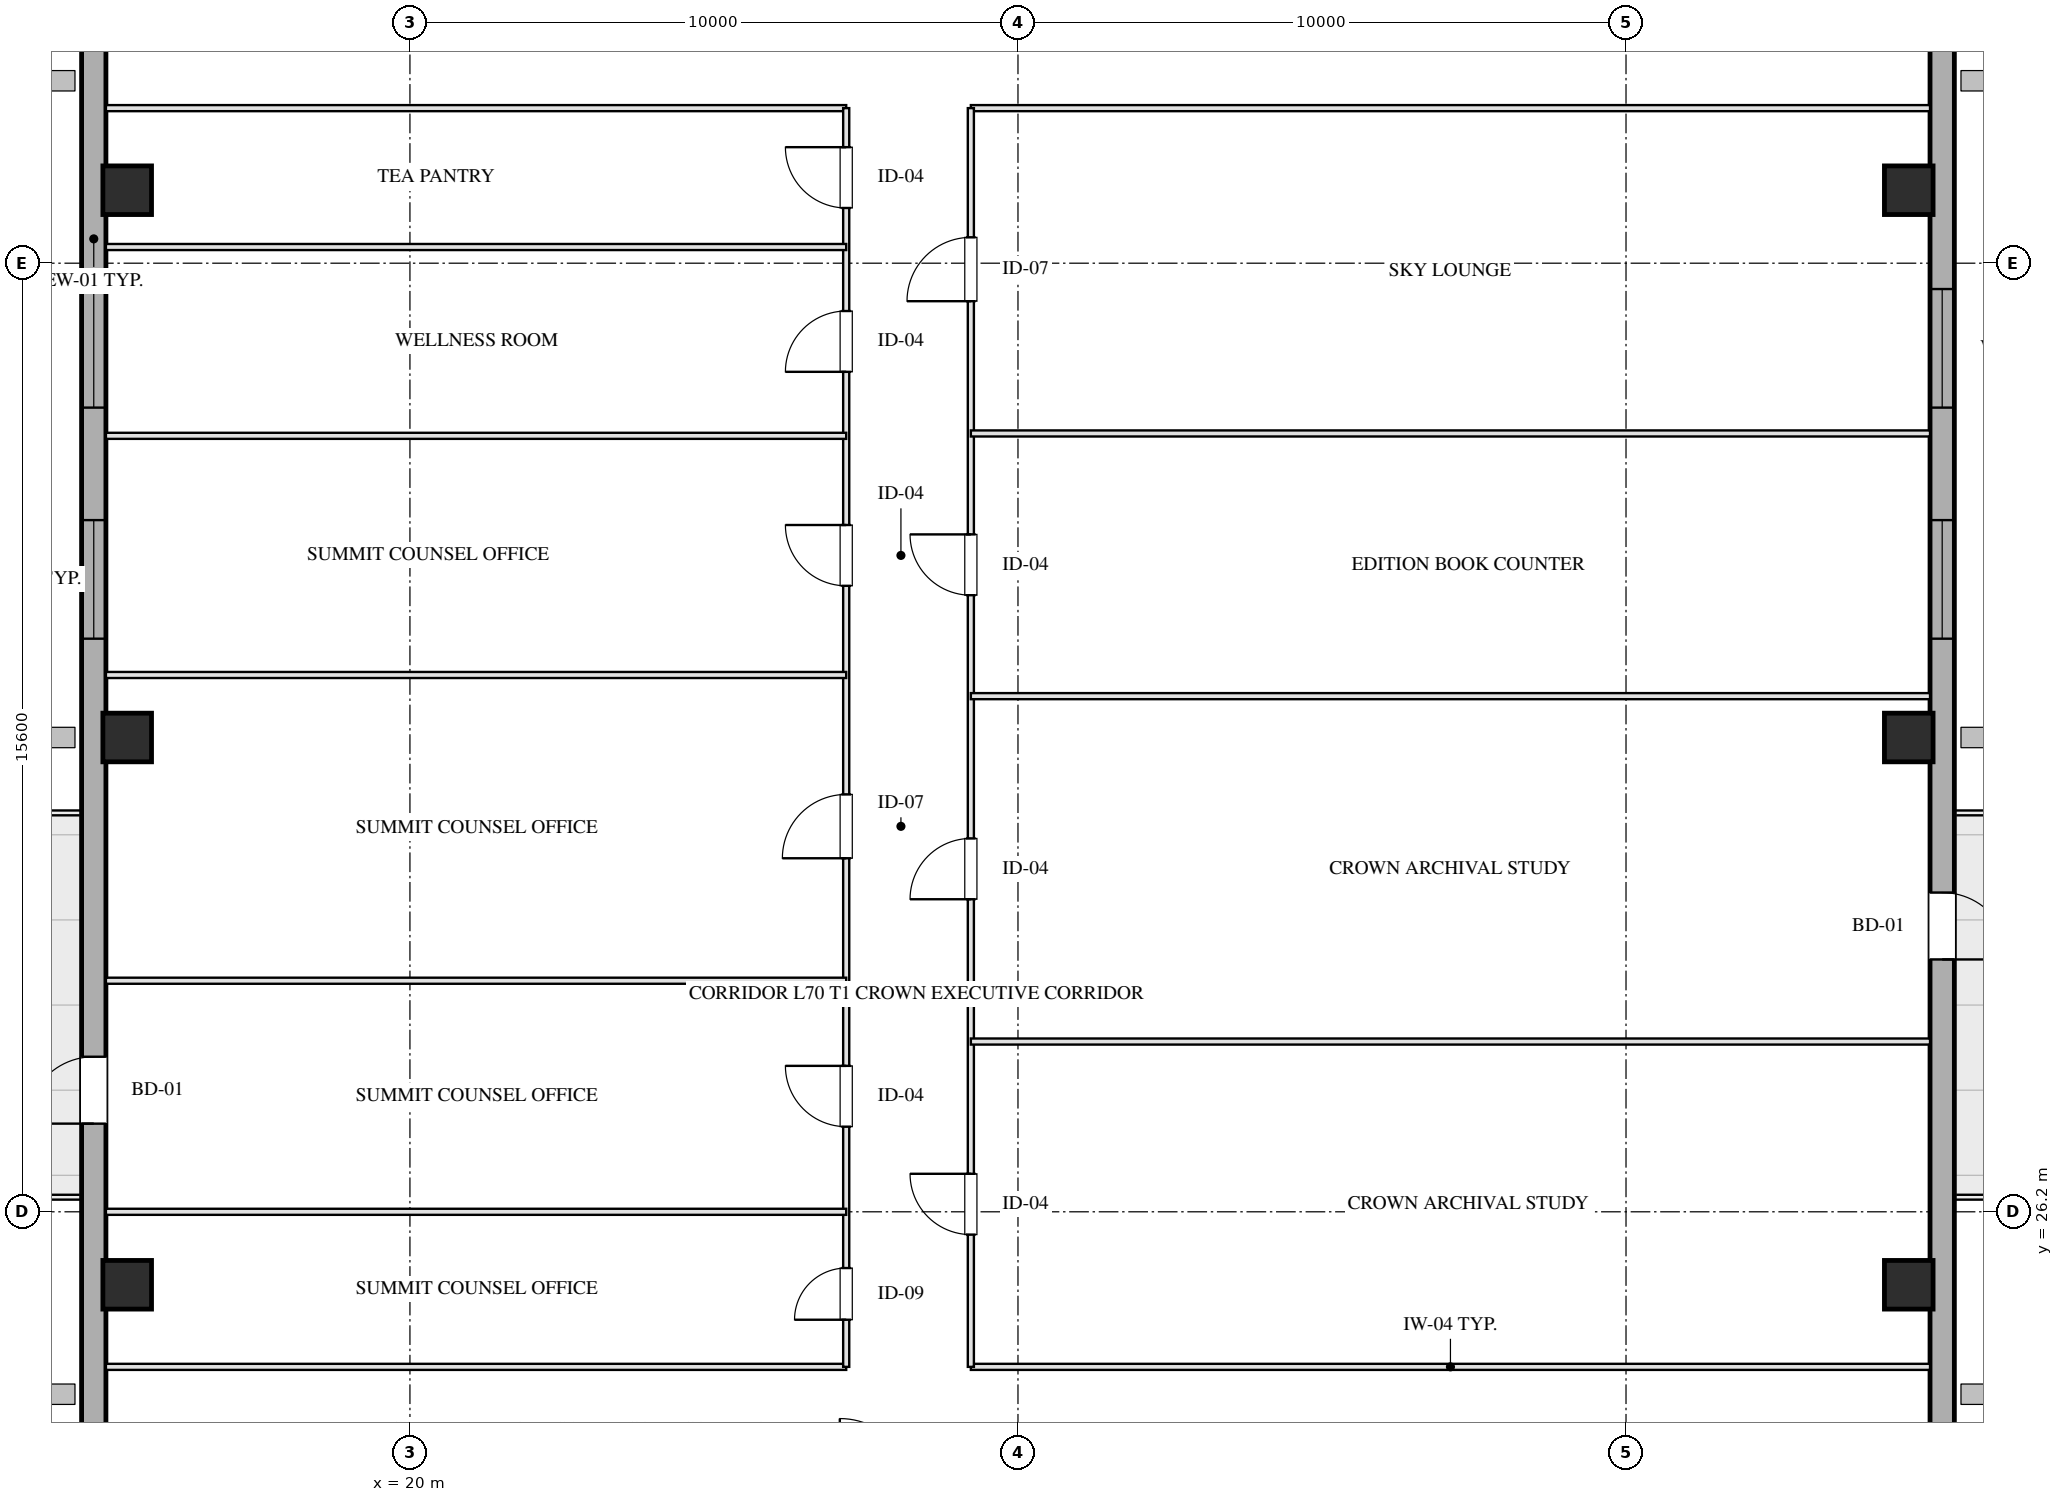
"""IFC4 building model, lengths in metres.
Left out: names, types, materials, properties, quantities, classifications, styles, units other than length and angle.
Written with IfcOpenShell. Run it as: python <this file> out.ifc"""

import sys

from ifc_helpers import new_model, si_unit, direction, frame, frame_2d, origin, origin_2d, place, context, subcontext, project, spatial, rectangle, hollow_rectangle, extrude, element, fill, save


model = new_model("IFC4")
c1 = context("Model", 3, precision=1e-05, world=origin(), true_north=direction((0.0, 1.0)))
c2 = subcontext(c1, "Body", "Model", "MODEL_VIEW")
j1 = project(units=[si_unit("LENGTHUNIT", "METRE"), si_unit("PLANEANGLEUNIT", "RADIAN")], contexts=[c1])
p1 = place(None, origin())
s1 = spatial("IfcSite", under=j1, at=p1, CompositionType="ELEMENT")
p2 = place(p1, origin())
s2 = spatial("IfcBuilding", under=s1, at=p2, CompositionType="ELEMENT")
p3 = place(p2, frame((0.0, 0.0, 256.8)))
s3 = spatial("IfcBuildingStorey", under=s2, at=p3, CompositionType="ELEMENT", Elevation=256.8)
for number, where, z_axis, x_axis in (
    (1, (15.35, 25.0, 0.0), (0.0, 0.0, 1.0), (1.0, 0.0, 0.0)),
    (2, (15.35, 34.0, 0.0), (0.0, 0.0, 1.0), (1.0, 0.0, 0.0)),
    (3, (15.35, 43.0, 0.0), (0.0, 0.0, 1.0), (1.0, 0.0, 0.0)),
    (4, (44.65, 25.0, 0.0), (0.0, 0.0, 1.0), (1.0, 0.0, 0.0)),
    (5, (44.65, 34.0, 0.0), (0.0, 0.0, 1.0), (1.0, 0.0, 0.0)),
    (6, (44.65, 43.0, 0.0), (0.0, 0.0, 1.0), (1.0, 0.0, 0.0)),
):
    element("IfcColumn", number, at=place(p3, frame(where, z_axis=z_axis, x_axis=x_axis)), inside=s3, PredefinedType="COLUMN", context=c2, shape_type="SweptSolid", body=[
        extrude(hollow_rectangle(XDim=0.8, YDim=0.8, WallThickness=0.028, at=origin_2d()), origin(), (0.0, 0.0, 1.0), 3.201),
    ])
p4 = place(p3, frame((14.8, 13.1, 0.0), z_axis=(0.0, 0.0, 1.0), x_axis=(0.0, 1.0, 0.0)))
e7 = element("IfcWall", 7, at=p4, inside=s3, PredefinedType="SOLIDWALL", context=c2, shape_type="SweptSolid", body=[
    extrude(rectangle(XDim=41.8, YDim=0.4, at=frame_2d((20.9, 0.0))), origin(), (0.0, 0.0, 1.0), 2.36),
])
p5 = place(p4, frame((22.525, 0.0, 0.75)))
e8 = element("IfcOpeningElement", 8, at=p5, cuts=e7, PredefinedType="OPENING", context=c2, shape_type="SweptSolid", body=[
    extrude(rectangle(XDim=1.95, YDim=1.21, at=frame_2d((0.975, 0.605))), frame((0.0, 0.21, 0.0), z_axis=(0.0, -1.0, 0.0), x_axis=(1.0, 0.0, 0.0)), (0.0, 0.0, 1.0), 0.42),
])
p6 = place(p4, frame((26.325, 0.0, 0.75)))
e9 = element("IfcOpeningElement", 9, at=p6, cuts=e7, PredefinedType="OPENING", context=c2, shape_type="SweptSolid", body=[
    extrude(rectangle(XDim=1.95, YDim=1.21, at=frame_2d((0.975, 0.605))), frame((0.0, 0.21, 0.0), z_axis=(0.0, -1.0, 0.0), x_axis=(1.0, 0.0, 0.0)), (0.0, 0.0, 1.0), 0.42),
])
p7 = place(p4, frame((14.55, 0.0, 0.0)))
e10 = element("IfcOpeningElement", 10, at=p7, cuts=e7, PredefinedType="OPENING", context=c2, shape_type="SweptSolid", body=[
    extrude(rectangle(XDim=1.1, YDim=2.15, at=frame_2d((0.55, 1.075))), frame((0.0, 0.21, 0.0), z_axis=(0.0, -1.0, 0.0), x_axis=(1.0, 0.0, 0.0)), (0.0, 0.0, 1.0), 0.42),
])
p8 = place(p3, frame((45.2, 54.9, 0.0), z_axis=(0.0, 0.0, 1.0), x_axis=(0.0, -1.0, 0.0)))
e11 = element("IfcWall", 11, at=p8, inside=s3, PredefinedType="SOLIDWALL", context=c2, shape_type="SweptSolid", body=[
    extrude(rectangle(XDim=41.8, YDim=0.4, at=frame_2d((20.9, 0.0))), origin(), (0.0, 0.0, 1.0), 2.36),
])
p9 = place(p8, frame((17.325, 0.0, 0.75)))
e12 = element("IfcOpeningElement", 12, at=p9, cuts=e11, PredefinedType="OPENING", context=c2, shape_type="SweptSolid", body=[
    extrude(rectangle(XDim=1.95, YDim=1.21, at=frame_2d((0.975, 0.605))), frame((0.0, 0.21, 0.0), z_axis=(0.0, -1.0, 0.0), x_axis=(1.0, 0.0, 0.0)), (0.0, 0.0, 1.0), 0.42),
])
p10 = place(p8, frame((13.525, 0.0, 0.75)))
e13 = element("IfcOpeningElement", 13, at=p10, cuts=e11, PredefinedType="OPENING", context=c2, shape_type="SweptSolid", body=[
    extrude(rectangle(XDim=1.95, YDim=1.21, at=frame_2d((0.975, 0.605))), frame((0.0, 0.21, 0.0), z_axis=(0.0, -1.0, 0.0), x_axis=(1.0, 0.0, 0.0)), (0.0, 0.0, 1.0), 0.42),
])
p11 = place(p8, frame((23.45, 0.0, 0.0)))
e14 = element("IfcOpeningElement", 14, at=p11, cuts=e11, PredefinedType="OPENING", context=c2, shape_type="SweptSolid", body=[
    extrude(rectangle(XDim=1.1, YDim=2.15, at=frame_2d((0.55, 1.075))), frame((0.0, 0.21, 0.0), z_axis=(0.0, -1.0, 0.0), x_axis=(1.0, 0.0, 0.0)), (0.0, 0.0, 1.0), 0.42),
])
p12 = place(p3, frame((15.0, 23.65, 0.0), z_axis=(0.0, 0.0, 1.0), x_axis=(1.0, 0.0, 0.0)))
e15 = element("IfcWall", 15, at=p12, inside=s3, PredefinedType="MOVABLE", context=c2, shape_type="SweptSolid", body=[
    extrude(rectangle(XDim=12.175, YDim=0.1, at=frame_2d((6.087, 0.0))), origin(), (0.0, 0.0, 1.0), 2.925),
])
p13 = place(p3, frame((29.225, 23.65, 0.0), z_axis=(0.0, 0.0, 1.0), x_axis=(1.0, 0.0, 0.0)))
e16 = element("IfcWall", 16, at=p13, inside=s3, PredefinedType="MOVABLE", context=c2, shape_type="SweptSolid", body=[
    extrude(rectangle(XDim=15.775, YDim=0.1, at=frame_2d((7.887, 0.0))), origin(), (0.0, 0.0, 1.0), 2.925),
])
p14 = place(p3, frame((15.0, 44.35, 0.0), z_axis=(0.0, 0.0, 1.0), x_axis=(1.0, 0.0, 0.0)))
e17 = element("IfcWall", 17, at=p14, inside=s3, PredefinedType="MOVABLE", context=c2, shape_type="SweptSolid", body=[
    extrude(rectangle(XDim=12.175, YDim=0.1, at=frame_2d((6.087, 0.0))), origin(), (0.0, 0.0, 1.0), 2.925),
])
p15 = place(p3, frame((29.225, 44.35, 0.0), z_axis=(0.0, 0.0, 1.0), x_axis=(1.0, 0.0, 0.0)))
e18 = element("IfcWall", 18, at=p15, inside=s3, PredefinedType="MOVABLE", context=c2, shape_type="SweptSolid", body=[
    extrude(rectangle(XDim=15.775, YDim=0.1, at=frame_2d((7.887, 0.0))), origin(), (0.0, 0.0, 1.0), 2.925),
])
p16 = place(p3, frame((27.175, 23.65, 0.0), z_axis=(0.0, 0.0, 1.0), x_axis=(0.0, 1.0, 0.0)))
e19 = element("IfcWall", 19, at=p16, inside=s3, PredefinedType="MOVABLE", context=c2, shape_type="SweptSolid", body=[
    extrude(rectangle(XDim=20.7, YDim=0.1, at=frame_2d((10.35, 0.0))), origin(), (0.0, 0.0, 1.0), 2.925),
])
p17 = place(p16, frame((0.775, 0.0, 0.0)))
e20 = element("IfcOpeningElement", 20, at=p17, cuts=e19, PredefinedType="OPENING", context=c2, shape_type="SweptSolid", body=[
    extrude(rectangle(XDim=0.85, YDim=2.05, at=frame_2d((0.425, 1.025))), frame((0.0, 0.06, 0.0), z_axis=(0.0, -1.0, 0.0), x_axis=(1.0, 0.0, 0.0)), (0.0, 0.0, 1.0), 0.12),
])
p18 = place(p16, frame((3.95, 0.0, 0.0)))
e21 = element("IfcOpeningElement", 21, at=p18, cuts=e19, PredefinedType="OPENING", context=c2, shape_type="SweptSolid", body=[
    extrude(rectangle(XDim=1.0, YDim=2.05, at=frame_2d((0.5, 1.025))), frame((0.0, 0.06, 0.0), z_axis=(0.0, -1.0, 0.0), x_axis=(1.0, 0.0, 0.0)), (0.0, 0.0, 1.0), 0.12),
])
p19 = place(p16, frame((8.364, 0.0, 0.0)))
e22 = element("IfcOpeningElement", 22, at=p19, cuts=e19, PredefinedType="OPENING", context=c2, shape_type="SweptSolid", body=[
    extrude(rectangle(XDim=1.05, YDim=2.05, at=frame_2d((0.525, 1.025))), frame((0.0, 0.06, 0.0), z_axis=(0.0, -1.0, 0.0), x_axis=(1.0, 0.0, 0.0)), (0.0, 0.0, 1.0), 0.12),
])
p20 = place(p16, frame((12.844, 0.0, 0.0)))
e23 = element("IfcOpeningElement", 23, at=p20, cuts=e19, PredefinedType="OPENING", context=c2, shape_type="SweptSolid", body=[
    extrude(rectangle(XDim=1.0, YDim=2.05, at=frame_2d((0.5, 1.025))), frame((0.0, 0.06, 0.0), z_axis=(0.0, -1.0, 0.0), x_axis=(1.0, 0.0, 0.0)), (0.0, 0.0, 1.0), 0.12),
])
p21 = place(p16, frame((16.364, 0.0, 0.0)))
e24 = element("IfcOpeningElement", 24, at=p21, cuts=e19, PredefinedType="OPENING", context=c2, shape_type="SweptSolid", body=[
    extrude(rectangle(XDim=1.0, YDim=2.05, at=frame_2d((0.5, 1.025))), frame((0.0, 0.06, 0.0), z_axis=(0.0, -1.0, 0.0), x_axis=(1.0, 0.0, 0.0)), (0.0, 0.0, 1.0), 0.12),
])
p22 = place(p16, frame((19.058, 0.0, 0.0)))
e25 = element("IfcOpeningElement", 25, at=p22, cuts=e19, PredefinedType="OPENING", context=c2, shape_type="SweptSolid", body=[
    extrude(rectangle(XDim=1.0, YDim=2.05, at=frame_2d((0.5, 1.025))), frame((0.0, 0.06, 0.0), z_axis=(0.0, -1.0, 0.0), x_axis=(1.0, 0.0, 0.0)), (0.0, 0.0, 1.0), 0.12),
])
p23 = place(p3, frame((29.225, 23.65, 0.0), z_axis=(0.0, 0.0, 1.0), x_axis=(0.0, 1.0, 0.0)))
e26 = element("IfcWall", 26, at=p23, inside=s3, PredefinedType="MOVABLE", context=c2, shape_type="SweptSolid", body=[
    extrude(rectangle(XDim=20.7, YDim=0.1, at=frame_2d((10.35, 0.0))), origin(), (0.0, 0.0, 1.0), 2.925),
])
p24 = place(p23, frame((2.175, 0.0, 0.0)))
e27 = element("IfcOpeningElement", 27, at=p24, cuts=e26, PredefinedType="OPENING", context=c2, shape_type="SweptSolid", body=[
    extrude(rectangle(XDim=1.0, YDim=2.05, at=frame_2d((0.5, 1.025))), frame((0.0, 0.06, 0.0), z_axis=(0.0, -1.0, 0.0), x_axis=(1.0, 0.0, 0.0)), (0.0, 0.0, 1.0), 0.12),
])
p25 = place(p23, frame((7.69, 0.0, 0.0)))
e28 = element("IfcOpeningElement", 28, at=p25, cuts=e26, PredefinedType="OPENING", context=c2, shape_type="SweptSolid", body=[
    extrude(rectangle(XDim=1.0, YDim=2.05, at=frame_2d((0.5, 1.025))), frame((0.0, 0.06, 0.0), z_axis=(0.0, -1.0, 0.0), x_axis=(1.0, 0.0, 0.0)), (0.0, 0.0, 1.0), 0.12),
])
p26 = place(p23, frame((12.69, 0.0, 0.0)))
e29 = element("IfcOpeningElement", 29, at=p26, cuts=e26, PredefinedType="OPENING", context=c2, shape_type="SweptSolid", body=[
    extrude(rectangle(XDim=1.0, YDim=2.05, at=frame_2d((0.5, 1.025))), frame((0.0, 0.06, 0.0), z_axis=(0.0, -1.0, 0.0), x_axis=(1.0, 0.0, 0.0)), (0.0, 0.0, 1.0), 0.12),
])
p27 = place(p23, frame((17.525, 0.0, 0.0)))
e30 = element("IfcOpeningElement", 30, at=p27, cuts=e26, PredefinedType="OPENING", context=c2, shape_type="SweptSolid", body=[
    extrude(rectangle(XDim=1.05, YDim=2.05, at=frame_2d((0.525, 1.025))), frame((0.0, 0.06, 0.0), z_axis=(0.0, -1.0, 0.0), x_axis=(1.0, 0.0, 0.0)), (0.0, 0.0, 1.0), 0.12),
])
for number, where, z_axis, x_axis in (
    (31, (15.0, 26.2, 0.0), (0.0, 0.0, 1.0), (1.0, 0.0, 0.0)),
    (32, (15.0, 30.0, 0.0), (0.0, 0.0, 1.0), (1.0, 0.0, 0.0)),
    (33, (15.0, 35.028, 0.0), (0.0, 0.0, 1.0), (1.0, 0.0, 0.0)),
    (34, (15.0, 38.961, 0.0), (0.0, 0.0, 1.0), (1.0, 0.0, 0.0)),
    (35, (15.0, 42.066, 0.0), (0.0, 0.0, 1.0), (1.0, 0.0, 0.0)),
):
    element("IfcWall", number, at=place(p3, frame(where, z_axis=z_axis, x_axis=x_axis)), inside=s3, PredefinedType="MOVABLE", context=c2, shape_type="SweptSolid", body=[
        extrude(rectangle(XDim=12.175, YDim=0.1, at=frame_2d((6.087, 0.0))), origin(), (0.0, 0.0, 1.0), 2.925),
    ])
for number, where, z_axis, x_axis in (
    (36, (29.225, 29.0, 0.0), (0.0, 0.0, 1.0), (1.0, 0.0, 0.0)),
    (37, (29.225, 34.68, 0.0), (0.0, 0.0, 1.0), (1.0, 0.0, 0.0)),
    (38, (29.225, 39.0, 0.0), (0.0, 0.0, 1.0), (1.0, 0.0, 0.0)),
):
    element("IfcWall", number, at=place(p3, frame(where, z_axis=z_axis, x_axis=x_axis)), inside=s3, PredefinedType="MOVABLE", context=c2, shape_type="SweptSolid", body=[
        extrude(rectangle(XDim=15.775, YDim=0.1, at=frame_2d((7.887, 0.0))), origin(), (0.0, 0.0, 1.0), 2.925),
    ])
p28 = place(p5, origin())
e39 = element("IfcWindow", 39, at=p28, inside=s3, PartitioningType="TRIPLE_PANEL_VERTICAL", PredefinedType="WINDOW", context=c2, shape_type="SweptSolid", body=[
    extrude(rectangle(XDim=1.95, YDim=1.21, at=frame_2d((0.975, 0.605))), frame((0.0, 0.03, 0.0), z_axis=(0.0, -1.0, 0.0), x_axis=(1.0, 0.0, 0.0)), (0.0, 0.0, 1.0), 0.06),
])
fill(e8, e39)
p29 = place(p6, origin())
e40 = element("IfcWindow", 40, at=p29, inside=s3, PartitioningType="TRIPLE_PANEL_VERTICAL", PredefinedType="WINDOW", context=c2, shape_type="SweptSolid", body=[
    extrude(rectangle(XDim=1.95, YDim=1.21, at=frame_2d((0.975, 0.605))), frame((0.0, 0.03, 0.0), z_axis=(0.0, -1.0, 0.0), x_axis=(1.0, 0.0, 0.0)), (0.0, 0.0, 1.0), 0.06),
])
fill(e9, e40)
p30 = place(p9, origin())
e41 = element("IfcWindow", 41, at=p30, inside=s3, PartitioningType="TRIPLE_PANEL_VERTICAL", PredefinedType="WINDOW", context=c2, shape_type="SweptSolid", body=[
    extrude(rectangle(XDim=1.95, YDim=1.21, at=frame_2d((0.975, 0.605))), frame((0.0, 0.03, 0.0), z_axis=(0.0, -1.0, 0.0), x_axis=(1.0, 0.0, 0.0)), (0.0, 0.0, 1.0), 0.06),
])
fill(e12, e41)
p31 = place(p10, origin())
e42 = element("IfcWindow", 42, at=p31, inside=s3, PartitioningType="TRIPLE_PANEL_VERTICAL", PredefinedType="WINDOW", context=c2, shape_type="SweptSolid", body=[
    extrude(rectangle(XDim=1.95, YDim=1.21, at=frame_2d((0.975, 0.605))), frame((0.0, 0.03, 0.0), z_axis=(0.0, -1.0, 0.0), x_axis=(1.0, 0.0, 0.0)), (0.0, 0.0, 1.0), 0.06),
])
fill(e13, e42)
p32 = place(p7, origin())
e43 = element("IfcDoor", 43, at=p32, inside=s3, OperationType="SINGLE_SWING_LEFT", PredefinedType="DOOR", context=c2, shape_type="SweptSolid", body=[
    extrude(rectangle(XDim=1.1, YDim=2.15, at=frame_2d((0.55, 1.075))), frame((0.0, 0.025, 0.0), z_axis=(0.0, -1.0, 0.0), x_axis=(1.0, 0.0, 0.0)), (0.0, 0.0, 1.0), 0.05),
])
fill(e10, e43)
p33 = place(p11, origin())
e44 = element("IfcDoor", 44, at=p33, inside=s3, OperationType="SINGLE_SWING_RIGHT", PredefinedType="DOOR", context=c2, shape_type="SweptSolid", body=[
    extrude(rectangle(XDim=1.1, YDim=2.15, at=frame_2d((0.55, 1.075))), frame((0.0, 0.025, 0.0), z_axis=(0.0, -1.0, 0.0), x_axis=(1.0, 0.0, 0.0)), (0.0, 0.0, 1.0), 0.05),
])
fill(e14, e44)
p34 = place(p17, origin())
e45 = element("IfcDoor", 45, at=p34, inside=s3, OperationType="SINGLE_SWING_LEFT", PredefinedType="DOOR", context=c2, shape_type="SweptSolid", body=[
    extrude(rectangle(XDim=0.85, YDim=2.05, at=frame_2d((0.425, 1.025))), frame((0.0, 0.025, 0.0), z_axis=(0.0, -1.0, 0.0), x_axis=(1.0, 0.0, 0.0)), (0.0, 0.0, 1.0), 0.05),
])
fill(e20, e45)
p35 = place(p18, origin())
e46 = element("IfcDoor", 46, at=p35, inside=s3, OperationType="SINGLE_SWING_RIGHT", PredefinedType="DOOR", context=c2, shape_type="SweptSolid", body=[
    extrude(rectangle(XDim=1.0, YDim=2.05, at=frame_2d((0.5, 1.025))), frame((0.0, 0.025, 0.0), z_axis=(0.0, -1.0, 0.0), x_axis=(1.0, 0.0, 0.0)), (0.0, 0.0, 1.0), 0.05),
])
fill(e21, e46)
p36 = place(p19, origin())
e47 = element("IfcDoor", 47, at=p36, inside=s3, OperationType="SINGLE_SWING_LEFT", PredefinedType="DOOR", context=c2, shape_type="SweptSolid", body=[
    extrude(rectangle(XDim=1.05, YDim=2.05, at=frame_2d((0.525, 1.025))), frame((0.0, 0.025, 0.0), z_axis=(0.0, -1.0, 0.0), x_axis=(1.0, 0.0, 0.0)), (0.0, 0.0, 1.0), 0.05),
])
fill(e22, e47)
p37 = place(p20, origin())
e48 = element("IfcDoor", 48, at=p37, inside=s3, OperationType="SINGLE_SWING_RIGHT", PredefinedType="DOOR", context=c2, shape_type="SweptSolid", body=[
    extrude(rectangle(XDim=1.0, YDim=2.05, at=frame_2d((0.5, 1.025))), frame((0.0, 0.025, 0.0), z_axis=(0.0, -1.0, 0.0), x_axis=(1.0, 0.0, 0.0)), (0.0, 0.0, 1.0), 0.05),
])
fill(e23, e48)
p38 = place(p21, origin())
e49 = element("IfcDoor", 49, at=p38, inside=s3, OperationType="SINGLE_SWING_LEFT", PredefinedType="DOOR", context=c2, shape_type="SweptSolid", body=[
    extrude(rectangle(XDim=1.0, YDim=2.05, at=frame_2d((0.5, 1.025))), frame((0.0, 0.025, 0.0), z_axis=(0.0, -1.0, 0.0), x_axis=(1.0, 0.0, 0.0)), (0.0, 0.0, 1.0), 0.05),
])
fill(e24, e49)
p39 = place(p22, origin())
e50 = element("IfcDoor", 50, at=p39, inside=s3, OperationType="SINGLE_SWING_RIGHT", PredefinedType="DOOR", context=c2, shape_type="SweptSolid", body=[
    extrude(rectangle(XDim=1.0, YDim=2.05, at=frame_2d((0.5, 1.025))), frame((0.0, 0.025, 0.0), z_axis=(0.0, -1.0, 0.0), x_axis=(1.0, 0.0, 0.0)), (0.0, 0.0, 1.0), 0.05),
])
fill(e25, e50)
p40 = place(p24, origin())
e51 = element("IfcDoor", 51, at=p40, inside=s3, OperationType="SINGLE_SWING_RIGHT", PredefinedType="DOOR", context=c2, shape_type="SweptSolid", body=[
    extrude(rectangle(XDim=1.0, YDim=2.05, at=frame_2d((0.5, 1.025))), frame((0.0, 0.025, 0.0), z_axis=(0.0, -1.0, 0.0), x_axis=(1.0, 0.0, 0.0)), (0.0, 0.0, 1.0), 0.05),
])
fill(e27, e51)
p41 = place(p25, origin())
e52 = element("IfcDoor", 52, at=p41, inside=s3, OperationType="SINGLE_SWING_LEFT", PredefinedType="DOOR", context=c2, shape_type="SweptSolid", body=[
    extrude(rectangle(XDim=1.0, YDim=2.05, at=frame_2d((0.5, 1.025))), frame((0.0, 0.025, 0.0), z_axis=(0.0, -1.0, 0.0), x_axis=(1.0, 0.0, 0.0)), (0.0, 0.0, 1.0), 0.05),
])
fill(e28, e52)
p42 = place(p26, origin())
e53 = element("IfcDoor", 53, at=p42, inside=s3, OperationType="SINGLE_SWING_RIGHT", PredefinedType="DOOR", context=c2, shape_type="SweptSolid", body=[
    extrude(rectangle(XDim=1.0, YDim=2.05, at=frame_2d((0.5, 1.025))), frame((0.0, 0.025, 0.0), z_axis=(0.0, -1.0, 0.0), x_axis=(1.0, 0.0, 0.0)), (0.0, 0.0, 1.0), 0.05),
])
fill(e29, e53)
p43 = place(p27, origin())
e54 = element("IfcDoor", 54, at=p43, inside=s3, OperationType="SINGLE_SWING_LEFT", PredefinedType="DOOR", context=c2, shape_type="SweptSolid", body=[
    extrude(rectangle(XDim=1.05, YDim=2.05, at=frame_2d((0.525, 1.025))), frame((0.0, 0.025, 0.0), z_axis=(0.0, -1.0, 0.0), x_axis=(1.0, 0.0, 0.0)), (0.0, 0.0, 1.0), 0.05),
])
fill(e30, e54)
save(model, sys.argv[1])
